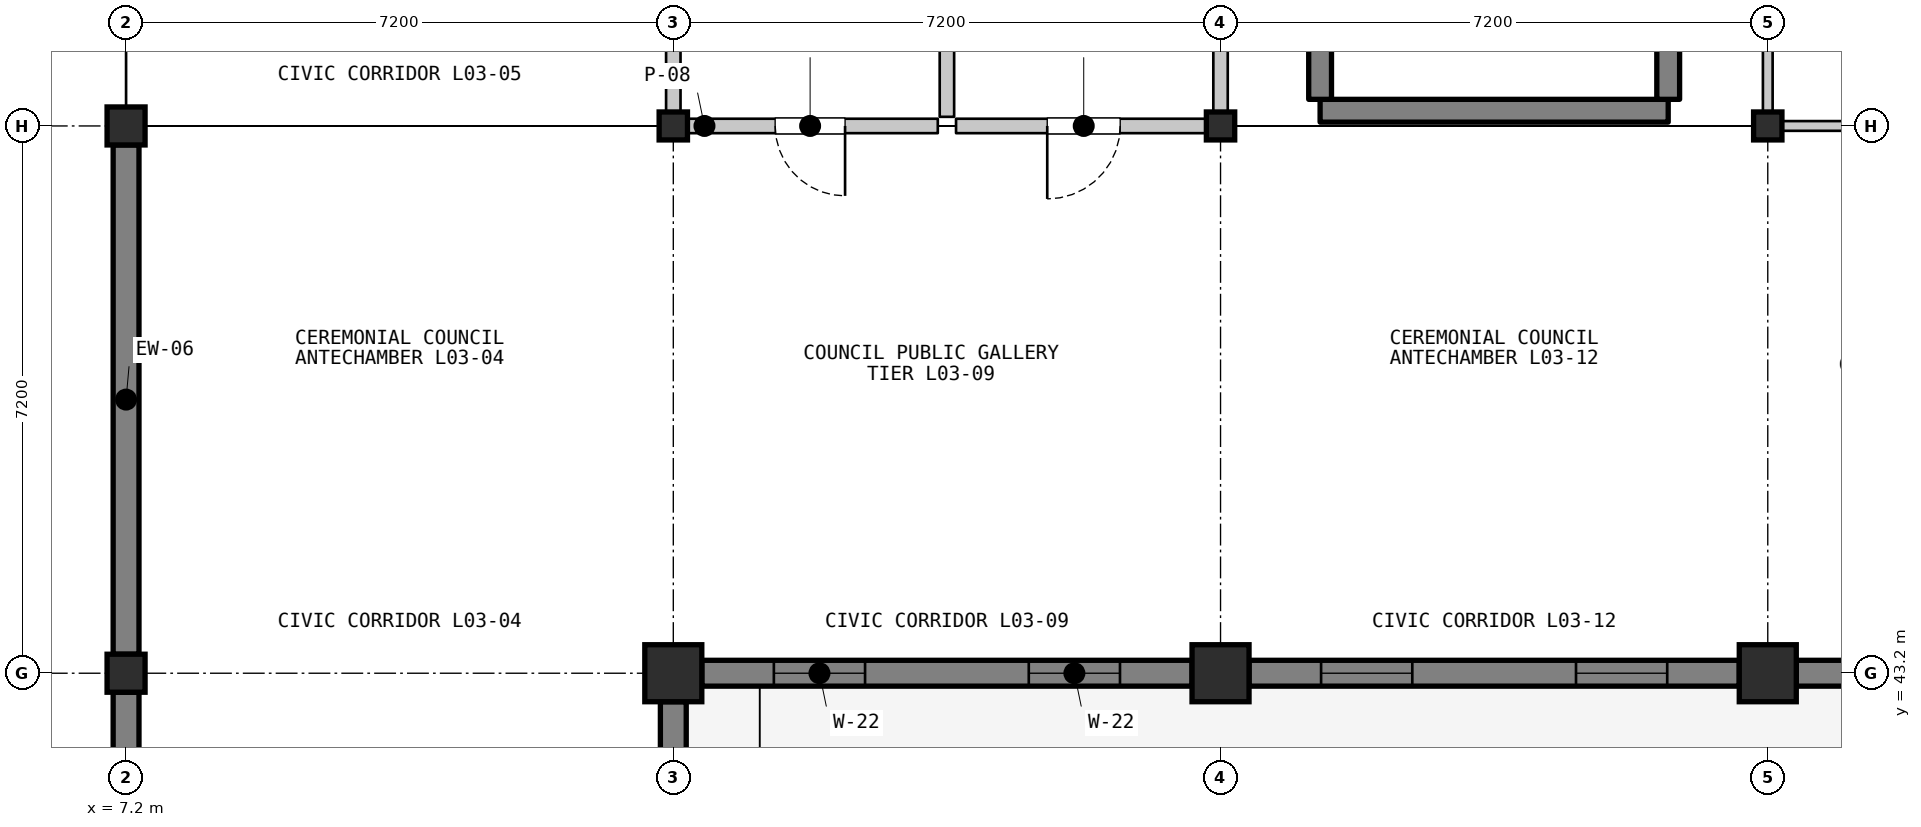
"""IFC4 building model, lengths in metres.
Left out: names, types, materials, properties, quantities, classifications, styles, units other than length and angle.
Written with IfcOpenShell. Run it as: python <this file> out.ifc"""

import sys

from ifc_helpers import new_model, si_unit, direction, frame, frame_2d, origin, origin_2d, place, context, subcontext, project, spatial, rectangle, i_section, extrude, element, fill, save


model = new_model("IFC4")
c1 = context("Model", 3, precision=1e-05, world=origin(), true_north=direction((0.0, 1.0)))
c2 = subcontext(c1, "Body", "Model", "MODEL_VIEW")
j1 = project(units=[si_unit("LENGTHUNIT", "METRE"), si_unit("PLANEANGLEUNIT", "RADIAN")], contexts=[c1])
p1 = place(None, origin())
s1 = spatial("IfcSite", under=j1, at=p1, CompositionType="ELEMENT")
p2 = place(p1, origin())
s2 = spatial("IfcBuilding", under=s1, at=p2, CompositionType="ELEMENT")
p3 = place(p2, frame((0.0, 0.0, 9.9)))
s3 = spatial("IfcBuildingStorey", under=s2, at=p3, CompositionType="ELEMENT", Elevation=9.9)
for number, where, z_axis, x_axis in (
    (1, (7.2, 43.2, 0.0), (0.0, 0.0, 1.0), (1.0, 0.0, 0.0)),
    (2, (7.2, 50.4, 0.0), (0.0, 0.0, 1.0), (1.0, 0.0, 0.0)),
):
    element("IfcColumn", number, at=place(p3, frame(where, z_axis=z_axis, x_axis=x_axis)), inside=s3, PredefinedType="COLUMN", context=c2, shape_type="SweptSolid", body=[
        extrude(rectangle(XDim=0.5, YDim=0.5, at=origin_2d()), origin(), (0.0, 0.0, 1.0), 4.2),
    ])
p4 = place(p3, frame((14.4, 43.2, 0.0), z_axis=(0.0, 0.0, 1.0), x_axis=(1.0, 0.0, 0.0)))
e3 = element("IfcColumn", 3, at=p4, inside=s3, PredefinedType="COLUMN", context=c2, shape_type="SweptSolid", body=[
    extrude(rectangle(XDim=0.75, YDim=0.75, at=origin_2d()), origin(), (0.0, 0.0, 1.0), 4.2),
])
p5 = place(p3, frame((14.4, 50.4, 0.0), z_axis=(0.0, 0.0, 1.0), x_axis=(1.0, 0.0, 0.0)))
e4 = element("IfcColumn", 4, at=p5, inside=s3, PredefinedType="COLUMN", context=c2, shape_type="SweptSolid", body=[
    extrude(i_section(OverallWidth=0.373, OverallDepth=0.368, WebThickness=0.015, FlangeThickness=0.024, FilletRadius=0.015, at=origin_2d()), origin(), (0.0, 0.0, 1.0), 4.2),
])
p6 = place(p3, frame((21.6, 43.2, 0.0), z_axis=(0.0, 0.0, 1.0), x_axis=(1.0, 0.0, 0.0)))
e5 = element("IfcColumn", 5, at=p6, inside=s3, PredefinedType="COLUMN", context=c2, shape_type="SweptSolid", body=[
    extrude(rectangle(XDim=0.75, YDim=0.75, at=origin_2d()), origin(), (0.0, 0.0, 1.0), 4.2),
])
p7 = place(p3, frame((21.6, 50.4, 0.0), z_axis=(0.0, 0.0, 1.0), x_axis=(1.0, 0.0, 0.0)))
e6 = element("IfcColumn", 6, at=p7, inside=s3, PredefinedType="COLUMN", context=c2, shape_type="SweptSolid", body=[
    extrude(i_section(OverallWidth=0.373, OverallDepth=0.368, WebThickness=0.015, FlangeThickness=0.024, FilletRadius=0.015, at=origin_2d()), origin(), (0.0, 0.0, 1.0), 4.2),
])
p8 = place(p3, frame((28.8, 43.2, 0.0), z_axis=(0.0, 0.0, 1.0), x_axis=(1.0, 0.0, 0.0)))
e7 = element("IfcColumn", 7, at=p8, inside=s3, PredefinedType="COLUMN", context=c2, shape_type="SweptSolid", body=[
    extrude(rectangle(XDim=0.75, YDim=0.75, at=origin_2d()), origin(), (0.0, 0.0, 1.0), 4.2),
])
p9 = place(p3, frame((28.8, 50.4, 0.0), z_axis=(0.0, 0.0, 1.0), x_axis=(1.0, 0.0, 0.0)))
e8 = element("IfcColumn", 8, at=p9, inside=s3, PredefinedType="COLUMN", context=c2, shape_type="SweptSolid", body=[
    extrude(i_section(OverallWidth=0.373, OverallDepth=0.368, WebThickness=0.015, FlangeThickness=0.024, FilletRadius=0.015, at=origin_2d()), origin(), (0.0, 0.0, 1.0), 4.2),
])
p10 = place(p3, frame((7.2, 36.25, 0.0), z_axis=(0.0, 0.0, 1.0), x_axis=(0.0, 1.0, 0.0)))
e9 = element("IfcWall", 9, at=p10, inside=s3, PredefinedType="SOLIDWALL", context=c2, shape_type="SweptSolid", body=[
    extrude(rectangle(XDim=6.7, YDim=0.34, at=frame_2d((3.35, 0.0))), origin(), (0.0, 0.0, 1.0), 3.467),
])
p11 = place(p10, frame((0.883, 0.0, 0.95)))
e10 = element("IfcOpeningElement", 10, at=p11, cuts=e9, PredefinedType="OPENING", context=c2, shape_type="SweptSolid", body=[
    extrude(rectangle(XDim=1.45, YDim=2.15, at=frame_2d((0.725, 1.075))), frame((0.0, 0.18, 0.0), z_axis=(0.0, -1.0, 0.0), x_axis=(1.0, 0.0, 0.0)), (0.0, 0.0, 1.0), 0.36),
])
p12 = place(p10, frame((4.367, 0.0, 0.95)))
e11 = element("IfcOpeningElement", 11, at=p12, cuts=e9, PredefinedType="OPENING", context=c2, shape_type="SweptSolid", body=[
    extrude(rectangle(XDim=1.45, YDim=2.15, at=frame_2d((0.725, 1.075))), frame((0.0, 0.18, 0.0), z_axis=(0.0, -1.0, 0.0), x_axis=(1.0, 0.0, 0.0)), (0.0, 0.0, 1.0), 0.36),
])
p13 = place(p3, frame((14.4, 42.825, 0.0), z_axis=(0.0, 0.0, 1.0), x_axis=(0.0, -1.0, 0.0)))
e12 = element("IfcWall", 12, at=p13, inside=s3, PredefinedType="SOLIDWALL", context=c2, shape_type="SweptSolid", body=[
    extrude(rectangle(XDim=6.45, YDim=0.34, at=frame_2d((3.225, 0.0))), origin(), (0.0, 0.0, 1.0), 3.35),
])
p14 = place(p13, frame((0.948, 0.0, 0.95)))
e13 = element("IfcOpeningElement", 13, at=p14, cuts=e12, PredefinedType="OPENING", context=c2, shape_type="SweptSolid", body=[
    extrude(rectangle(XDim=1.2, YDim=1.7, at=frame_2d((0.6, 0.85))), frame((0.0, 0.18, 0.0), z_axis=(0.0, -1.0, 0.0), x_axis=(1.0, 0.0, 0.0)), (0.0, 0.0, 1.0), 0.36),
])
p15 = place(p13, frame((4.302, 0.0, 0.95)))
e14 = element("IfcOpeningElement", 14, at=p15, cuts=e12, PredefinedType="OPENING", context=c2, shape_type="SweptSolid", body=[
    extrude(rectangle(XDim=1.2, YDim=1.7, at=frame_2d((0.6, 0.85))), frame((0.0, 0.18, 0.0), z_axis=(0.0, -1.0, 0.0), x_axis=(1.0, 0.0, 0.0)), (0.0, 0.0, 1.0), 0.36),
])
p16 = place(p3, frame((7.2, 43.45, 0.0), z_axis=(0.0, 0.0, 1.0), x_axis=(0.0, 1.0, 0.0)))
e15 = element("IfcWall", 15, at=p16, inside=s3, PredefinedType="SOLIDWALL", context=c2, shape_type="SweptSolid", body=[
    extrude(rectangle(XDim=6.7, YDim=0.34, at=frame_2d((3.35, 0.0))), origin(), (0.0, 0.0, 1.0), 3.467),
])
p17 = place(p3, frame((21.225, 43.2, 0.0), z_axis=(0.0, 0.0, 1.0), x_axis=(-1.0, 0.0, 0.0)))
e16 = element("IfcWall", 16, at=p17, inside=s3, PredefinedType="SOLIDWALL", context=c2, shape_type="SweptSolid", body=[
    extrude(rectangle(XDim=6.45, YDim=0.34, at=frame_2d((3.225, 0.0))), origin(), (0.0, 0.0, 1.0), 3.398),
])
p18 = place(p17, frame((0.948, 0.0, 0.95)))
e17 = element("IfcOpeningElement", 17, at=p18, cuts=e16, PredefinedType="OPENING", context=c2, shape_type="SweptSolid", body=[
    extrude(rectangle(XDim=1.2, YDim=1.7, at=frame_2d((0.6, 0.85))), frame((0.0, 0.18, 0.0), z_axis=(0.0, -1.0, 0.0), x_axis=(1.0, 0.0, 0.0)), (0.0, 0.0, 1.0), 0.36),
])
p19 = place(p17, frame((4.302, 0.0, 0.95)))
e18 = element("IfcOpeningElement", 18, at=p19, cuts=e16, PredefinedType="OPENING", context=c2, shape_type="SweptSolid", body=[
    extrude(rectangle(XDim=1.2, YDim=1.7, at=frame_2d((0.6, 0.85))), frame((0.0, 0.18, 0.0), z_axis=(0.0, -1.0, 0.0), x_axis=(1.0, 0.0, 0.0)), (0.0, 0.0, 1.0), 0.36),
])
p20 = place(p3, frame((28.425, 43.2, 0.0), z_axis=(0.0, 0.0, 1.0), x_axis=(-1.0, 0.0, 0.0)))
e19 = element("IfcWall", 19, at=p20, inside=s3, PredefinedType="SOLIDWALL", context=c2, shape_type="SweptSolid", body=[
    extrude(rectangle(XDim=6.45, YDim=0.34, at=frame_2d((3.225, 0.0))), origin(), (0.0, 0.0, 1.0), 3.398),
])
p21 = place(p20, frame((0.948, 0.0, 0.95)))
e20 = element("IfcOpeningElement", 20, at=p21, cuts=e19, PredefinedType="OPENING", context=c2, shape_type="SweptSolid", body=[
    extrude(rectangle(XDim=1.2, YDim=1.7, at=frame_2d((0.6, 0.85))), frame((0.0, 0.18, 0.0), z_axis=(0.0, -1.0, 0.0), x_axis=(1.0, 0.0, 0.0)), (0.0, 0.0, 1.0), 0.36),
])
p22 = place(p20, frame((4.302, 0.0, 0.95)))
e21 = element("IfcOpeningElement", 21, at=p22, cuts=e19, PredefinedType="OPENING", context=c2, shape_type="SweptSolid", body=[
    extrude(rectangle(XDim=1.2, YDim=1.7, at=frame_2d((0.6, 0.85))), frame((0.0, 0.18, 0.0), z_axis=(0.0, -1.0, 0.0), x_axis=(1.0, 0.0, 0.0)), (0.0, 0.0, 1.0), 0.36),
])
p23 = place(p3, frame((35.625, 43.2, 0.0), z_axis=(0.0, 0.0, 1.0), x_axis=(-1.0, 0.0, 0.0)))
e22 = element("IfcWall", 22, at=p23, inside=s3, PredefinedType="SOLIDWALL", context=c2, shape_type="SweptSolid", body=[
    extrude(rectangle(XDim=6.45, YDim=0.34, at=frame_2d((3.225, 0.0))), origin(), (0.0, 0.0, 1.0), 3.398),
])
p24 = place(p23, frame((0.948, 0.0, 0.95)))
e23 = element("IfcOpeningElement", 23, at=p24, cuts=e22, PredefinedType="OPENING", context=c2, shape_type="SweptSolid", body=[
    extrude(rectangle(XDim=1.2, YDim=1.7, at=frame_2d((0.6, 0.85))), frame((0.0, 0.18, 0.0), z_axis=(0.0, -1.0, 0.0), x_axis=(1.0, 0.0, 0.0)), (0.0, 0.0, 1.0), 0.36),
])
p25 = place(p23, frame((4.302, 0.0, 0.95)))
e24 = element("IfcOpeningElement", 24, at=p25, cuts=e22, PredefinedType="OPENING", context=c2, shape_type="SweptSolid", body=[
    extrude(rectangle(XDim=1.2, YDim=1.7, at=frame_2d((0.6, 0.85))), frame((0.0, 0.18, 0.0), z_axis=(0.0, -1.0, 0.0), x_axis=(1.0, 0.0, 0.0)), (0.0, 0.0, 1.0), 0.36),
])
p26 = place(p3, frame((22.91, 50.6, 0.0), z_axis=(0.0, 0.0, 1.0), x_axis=(1.0, 0.0, 0.0)))
e25 = element("IfcWall", 25, at=p26, inside=s3, PredefinedType="SHEAR", context=c2, shape_type="SweptSolid", body=[
    extrude(rectangle(XDim=4.58, YDim=0.3, at=frame_2d((2.29, 0.0))), origin(), (0.0, 0.0, 1.0), 4.02),
])
for number, where, z_axis, x_axis in (
    (26, (22.91, 50.75, 0.0), (0.0, 0.0, 1.0), (0.0, 1.0, 0.0)),
    (27, (27.49, 50.75, 0.0), (0.0, 0.0, 1.0), (0.0, 1.0, 0.0)),
):
    element("IfcWall", number, at=place(p3, frame(where, z_axis=z_axis, x_axis=x_axis)), inside=s3, PredefinedType="SHEAR", context=c2, shape_type="SweptSolid", body=[
        extrude(rectangle(XDim=9.3, YDim=0.3, at=frame_2d((4.65, 0.0))), origin(), (0.0, 0.0, 1.0), 4.02),
    ])
p27 = place(p3, frame((17.88, 50.4, 0.0), z_axis=(0.0, 0.0, 1.0), x_axis=(-1.0, 0.0, 0.0)))
e28 = element("IfcWall", 28, at=p27, inside=s3, PredefinedType="PARTITIONING", context=c2, shape_type="SweptSolid", body=[
    extrude(rectangle(XDim=3.36, YDim=0.19, at=frame_2d((1.68, 0.0))), origin(), (0.0, 0.0, 1.0), 3.388),
])
p28 = place(p27, frame((1.22, 0.0, 0.0)))
e29 = element("IfcOpeningElement", 29, at=p28, cuts=e28, PredefinedType="OPENING", context=c2, shape_type="SweptSolid", body=[
    extrude(rectangle(XDim=0.92, YDim=2.1, at=frame_2d((0.46, 1.05))), frame((0.0, 0.105, 0.0), z_axis=(0.0, -1.0, 0.0), x_axis=(1.0, 0.0, 0.0)), (0.0, 0.0, 1.0), 0.21),
])
p29 = place(p3, frame((14.4, 50.52, 0.0), z_axis=(0.0, 0.0, 1.0), x_axis=(0.0, 1.0, 0.0)))
e30 = element("IfcWall", 30, at=p29, inside=s3, PredefinedType="PARTITIONING", context=c2, shape_type="SweptSolid", body=[
    extrude(rectangle(XDim=6.8, YDim=0.19, at=frame_2d((3.4, 0.0))), origin(), (0.0, 0.0, 1.0), 3.388),
])
p30 = place(p3, frame((18.0, 57.48, 0.0), z_axis=(0.0, 0.0, 1.0), x_axis=(0.0, -1.0, 0.0)))
e31 = element("IfcWall", 31, at=p30, inside=s3, PredefinedType="PARTITIONING", context=c2, shape_type="SweptSolid", body=[
    extrude(rectangle(XDim=6.96, YDim=0.19, at=frame_2d((3.48, 0.0))), origin(), (0.0, 0.0, 1.0), 3.388),
])
p31 = place(p3, frame((21.48, 50.4, 0.0), z_axis=(0.0, 0.0, 1.0), x_axis=(-1.0, 0.0, 0.0)))
e32 = element("IfcWall", 32, at=p31, inside=s3, PredefinedType="PARTITIONING", context=c2, shape_type="SweptSolid", body=[
    extrude(rectangle(XDim=3.36, YDim=0.19, at=frame_2d((1.68, 0.0))), origin(), (0.0, 0.0, 1.0), 3.388),
])
p32 = place(p31, frame((1.2, 0.0, 0.0)))
e33 = element("IfcOpeningElement", 33, at=p32, cuts=e32, PredefinedType="OPENING", context=c2, shape_type="SweptSolid", body=[
    extrude(rectangle(XDim=0.96, YDim=2.1, at=frame_2d((0.48, 1.05))), frame((0.0, 0.105, 0.0), z_axis=(0.0, -1.0, 0.0), x_axis=(1.0, 0.0, 0.0)), (0.0, 0.0, 1.0), 0.21),
])
p33 = place(p3, frame((21.6, 57.32, 0.0), z_axis=(0.0, 0.0, 1.0), x_axis=(0.0, -1.0, 0.0)))
e34 = element("IfcWall", 34, at=p33, inside=s3, PredefinedType="PARTITIONING", context=c2, shape_type="SweptSolid", body=[
    extrude(rectangle(XDim=6.8, YDim=0.19, at=frame_2d((3.4, 0.0))), origin(), (0.0, 0.0, 1.0), 3.388),
])
p34 = place(p3, frame((35.88, 50.4, 0.0), z_axis=(0.0, 0.0, 1.0), x_axis=(-1.0, 0.0, 0.0)))
e35 = element("IfcWall", 35, at=p34, inside=s3, PredefinedType="PARTITIONING", context=c2, shape_type="SweptSolid", body=[
    extrude(rectangle(XDim=6.96, YDim=0.128, at=frame_2d((3.48, 0.0))), origin(), (0.0, 0.0, 1.0), 3.388),
])
p35 = place(p34, frame((2.52, 0.0, 0.0)))
e36 = element("IfcOpeningElement", 36, at=p35, cuts=e35, PredefinedType="OPENING", context=c2, shape_type="SweptSolid", body=[
    extrude(rectangle(XDim=1.92, YDim=2.38, at=frame_2d((0.96, 1.19))), frame((0.0, 0.074, 0.0), z_axis=(0.0, -1.0, 0.0), x_axis=(1.0, 0.0, 0.0)), (0.0, 0.0, 1.0), 0.148),
])
p36 = place(p3, frame((28.8, 50.52, 0.0), z_axis=(0.0, 0.0, 1.0), x_axis=(0.0, 1.0, 0.0)))
e37 = element("IfcWall", 37, at=p36, inside=s3, PredefinedType="PARTITIONING", context=c2, shape_type="SweptSolid", body=[
    extrude(rectangle(XDim=6.8, YDim=0.128, at=frame_2d((3.4, 0.0))), origin(), (0.0, 0.0, 1.0), 3.388),
])
p37 = place(p18, origin())
e38 = element("IfcWindow", 38, at=p37, inside=s3, PartitioningType="SINGLE_PANEL", PredefinedType="WINDOW", context=c2, shape_type="SweptSolid", body=[
    extrude(rectangle(XDim=1.2, YDim=1.7, at=frame_2d((0.6, 0.85))), frame((0.0, 0.03, 0.0), z_axis=(0.0, -1.0, 0.0), x_axis=(1.0, 0.0, 0.0)), (0.0, 0.0, 1.0), 0.06),
])
fill(e17, e38)
p38 = place(p19, origin())
e39 = element("IfcWindow", 39, at=p38, inside=s3, PartitioningType="SINGLE_PANEL", PredefinedType="WINDOW", context=c2, shape_type="SweptSolid", body=[
    extrude(rectangle(XDim=1.2, YDim=1.7, at=frame_2d((0.6, 0.85))), frame((0.0, 0.03, 0.0), z_axis=(0.0, -1.0, 0.0), x_axis=(1.0, 0.0, 0.0)), (0.0, 0.0, 1.0), 0.06),
])
fill(e18, e39)
p39 = place(p21, origin())
e40 = element("IfcWindow", 40, at=p39, inside=s3, PartitioningType="SINGLE_PANEL", PredefinedType="WINDOW", context=c2, shape_type="SweptSolid", body=[
    extrude(rectangle(XDim=1.2, YDim=1.7, at=frame_2d((0.6, 0.85))), frame((0.0, 0.03, 0.0), z_axis=(0.0, -1.0, 0.0), x_axis=(1.0, 0.0, 0.0)), (0.0, 0.0, 1.0), 0.06),
])
fill(e20, e40)
p40 = place(p22, origin())
e41 = element("IfcWindow", 41, at=p40, inside=s3, PartitioningType="SINGLE_PANEL", PredefinedType="WINDOW", context=c2, shape_type="SweptSolid", body=[
    extrude(rectangle(XDim=1.2, YDim=1.7, at=frame_2d((0.6, 0.85))), frame((0.0, 0.03, 0.0), z_axis=(0.0, -1.0, 0.0), x_axis=(1.0, 0.0, 0.0)), (0.0, 0.0, 1.0), 0.06),
])
fill(e21, e41)
p41 = place(p28, origin())
e42 = element("IfcDoor", 42, at=p41, inside=s3, OperationType="SINGLE_SWING_LEFT", PredefinedType="DOOR", context=c2, shape_type="SweptSolid", body=[
    extrude(rectangle(XDim=0.92, YDim=2.1, at=frame_2d((0.46, 1.05))), frame((0.0, 0.025, 0.0), z_axis=(0.0, -1.0, 0.0), x_axis=(1.0, 0.0, 0.0)), (0.0, 0.0, 1.0), 0.05),
])
fill(e29, e42)
p42 = place(p32, origin())
e43 = element("IfcDoor", 43, at=p42, inside=s3, OperationType="SINGLE_SWING_RIGHT", PredefinedType="DOOR", context=c2, shape_type="SweptSolid", body=[
    extrude(rectangle(XDim=0.96, YDim=2.1, at=frame_2d((0.48, 1.05))), frame((0.0, 0.025, 0.0), z_axis=(0.0, -1.0, 0.0), x_axis=(1.0, 0.0, 0.0)), (0.0, 0.0, 1.0), 0.05),
])
fill(e33, e43)
save(model, sys.argv[1])
